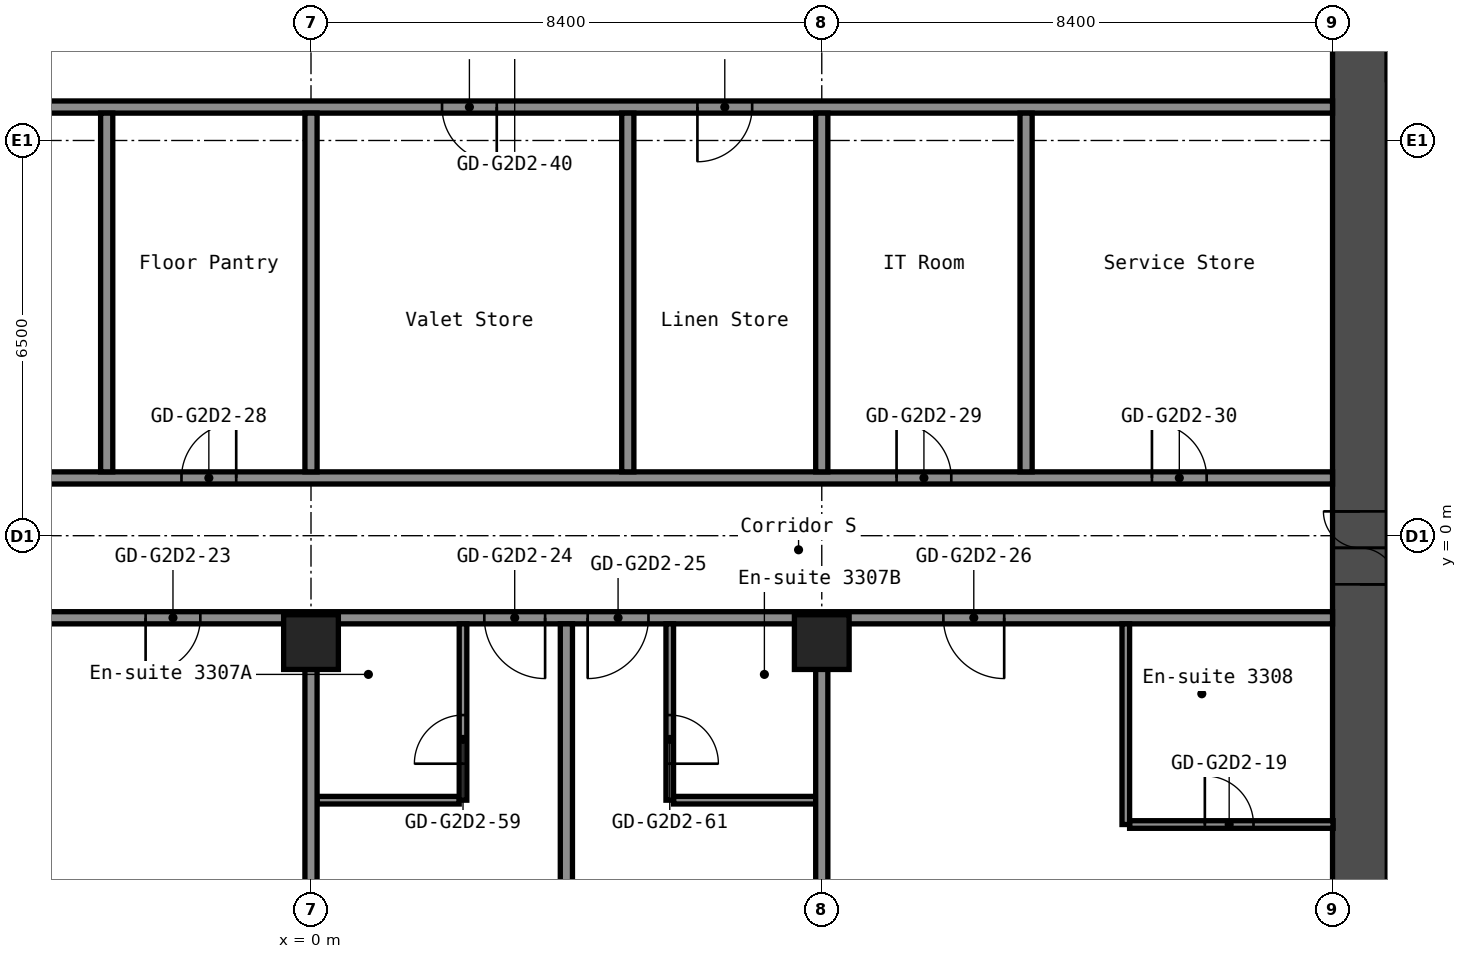
"""IFC4 building model, lengths in metres.
Left out: names, types, materials, properties, quantities, classifications, styles, units other than length and angle.
Written with IfcOpenShell. Run it as: python <this file> out.ifc"""

import sys

from ifc_helpers import new_model, si_unit, direction, frame, frame_2d, origin, origin_2d, place, context, subcontext, project, spatial, rectangle, hollow_rectangle, extrude, element, fill, save


model = new_model("IFC4")
c1 = context("Model", 3, precision=1e-05, world=origin(), true_north=direction((0.0, 1.0)))
c2 = subcontext(c1, "Body", "Model", "MODEL_VIEW")
j1 = project(units=[si_unit("LENGTHUNIT", "METRE"), si_unit("PLANEANGLEUNIT", "RADIAN")], contexts=[c1])
p1 = place(None, origin())
s1 = spatial("IfcSite", under=j1, at=p1, CompositionType="ELEMENT")
p2 = place(p1, origin())
s2 = spatial("IfcBuilding", under=s1, at=p2, CompositionType="ELEMENT")
p3 = place(p2, frame((0.0, 0.0, 117.0)))
s3 = spatial("IfcBuildingStorey", under=s2, at=p3, CompositionType="ELEMENT", Elevation=117.0)
for number, where, z_axis, x_axis in (
    (1, (0.0, -1.75, 0.0), (0.0, 0.0, 1.0), (1.0, 0.0, 0.0)),
    (2, (8.4, -1.75, 0.0), (0.0, 0.0, 1.0), (1.0, 0.0, 0.0)),
):
    element("IfcColumn", number, at=place(p3, frame(where, z_axis=z_axis, x_axis=x_axis)), inside=s3, PredefinedType="COLUMN", context=c2, shape_type="SweptSolid", body=[
        extrude(hollow_rectangle(XDim=0.9, YDim=0.9, WallThickness=0.036, at=origin_2d()), origin(), (0.0, 0.0, 1.0), 2.9),
    ])
p4 = place(p3, frame((17.25, -8.4, 0.0), z_axis=(0.0, 0.0, 1.0), x_axis=(0.0, 1.0, 0.0)))
e3 = element("IfcWall", 3, at=p4, inside=s3, PredefinedType="SHEAR", context=c2, shape_type="SweptSolid", body=[
    extrude(rectangle(XDim=16.8, YDim=0.9, at=frame_2d((8.4, 0.0))), origin(), (0.0, 0.0, 1.0), 2.9),
])
p5 = place(p4, frame((7.6, 0.0, 0.0)))
e4 = element("IfcOpeningElement", 4, at=p5, cuts=e3, PredefinedType="OPENING", context=c2, shape_type="SweptSolid", body=[
    extrude(rectangle(XDim=1.2, YDim=2.1, at=frame_2d((0.6, 1.05))), frame((0.0, 0.46, 0.0), z_axis=(0.0, -1.0, 0.0), x_axis=(1.0, 0.0, 0.0)), (0.0, 0.0, 1.0), 0.92),
])
p6 = place(p3, frame((17.7, 7.95, 0.0), z_axis=(0.0, 0.0, 1.0), x_axis=(1.0, 0.0, 0.0)))
e5 = element("IfcWall", 5, at=p6, inside=s3, PredefinedType="SHEAR", context=c2, shape_type="SweptSolid", body=[
    extrude(rectangle(XDim=15.0, YDim=0.9, at=frame_2d((7.5, 0.0))), origin(), (0.0, 0.0, 1.0), 2.9),
])
p7 = place(p6, frame((10.4, 0.0, 0.0)))
e6 = element("IfcOpeningElement", 6, at=p7, cuts=e5, PredefinedType="OPENING", context=c2, shape_type="SweptSolid", body=[
    extrude(rectangle(XDim=1.2, YDim=2.1, at=frame_2d((0.6, 1.05))), frame((0.0, 0.46, 0.0), z_axis=(0.0, -1.0, 0.0), x_axis=(1.0, 0.0, 0.0)), (0.0, 0.0, 1.0), 0.92),
])
p8 = place(p6, frame((13.35, 0.0, 0.0)))
e7 = element("IfcOpeningElement", 7, at=p8, cuts=e5, PredefinedType="OPENING", context=c2, shape_type="SweptSolid", body=[
    extrude(rectangle(XDim=0.9, YDim=2.1, at=frame_2d((0.45, 1.05))), frame((0.0, 0.46, 0.0), z_axis=(0.0, -1.0, 0.0), x_axis=(1.0, 0.0, 0.0)), (0.0, 0.0, 1.0), 0.92),
])
p9 = place(p3, frame((13.462, -4.75, 0.0), z_axis=(0.0, 0.0, 1.0), x_axis=(1.0, 0.0, 0.0)))
e8 = element("IfcWall", 8, at=p9, inside=s3, PredefinedType="PARTITIONING", context=c2, shape_type="SweptSolid", body=[
    extrude(rectangle(XDim=3.348, YDim=0.125, at=frame_2d((1.674, 0.0))), origin(), (0.0, 0.0, 1.0), 2.9),
])
p10 = place(p9, frame((1.238, 0.0, 0.0)))
e9 = element("IfcOpeningElement", 9, at=p10, cuts=e8, PredefinedType="OPENING", context=c2, shape_type="SweptSolid", body=[
    extrude(rectangle(XDim=0.8, YDim=2.1, at=frame_2d((0.4, 1.05))), frame((0.0, 0.073, 0.0), z_axis=(0.0, -1.0, 0.0), x_axis=(1.0, 0.0, 0.0)), (0.0, 0.0, 1.0), 0.145),
])
p11 = place(p3, frame((0.1, -4.35, 0.0), z_axis=(0.0, 0.0, 1.0), x_axis=(1.0, 0.0, 0.0)))
e10 = element("IfcWall", 10, at=p11, inside=s3, PredefinedType="PARTITIONING", context=c2, shape_type="SweptSolid", body=[
    extrude(rectangle(XDim=2.337, YDim=0.125, at=frame_2d((1.169, 0.0))), origin(), (0.0, 0.0, 1.0), 2.9),
])
p12 = place(p3, frame((5.962, -4.35, 0.0), z_axis=(0.0, 0.0, 1.0), x_axis=(1.0, 0.0, 0.0)))
e11 = element("IfcWall", 11, at=p12, inside=s3, PredefinedType="PARTITIONING", context=c2, shape_type="SweptSolid", body=[
    extrude(rectangle(XDim=2.338, YDim=0.125, at=frame_2d((1.169, 0.0))), origin(), (0.0, 0.0, 1.0), 2.9),
])
p13 = place(p3, frame((-16.8, -1.35, 0.0), z_axis=(0.0, 0.0, 1.0), x_axis=(1.0, 0.0, 0.0)))
e12 = element("IfcWall", 12, at=p13, inside=s3, PredefinedType="PARTITIONING", context=c2, shape_type="SweptSolid", body=[
    extrude(rectangle(XDim=33.6, YDim=0.2, at=frame_2d((16.8, 0.0))), origin(), (0.0, 0.0, 1.0), 2.9),
])
p14 = place(p13, frame((2.85, 0.0, 0.0)))
e13 = element("IfcOpeningElement", 13, at=p14, cuts=e12, PredefinedType="OPENING", context=c2, shape_type="SweptSolid", body=[
    extrude(rectangle(XDim=1.0, YDim=2.1, at=frame_2d((0.5, 1.05))), frame((0.0, 0.11, 0.0), z_axis=(0.0, -1.0, 0.0), x_axis=(1.0, 0.0, 0.0)), (0.0, 0.0, 1.0), 0.22),
])
p15 = place(p13, frame((4.55, 0.0, 0.0)))
e14 = element("IfcOpeningElement", 14, at=p15, cuts=e12, PredefinedType="OPENING", context=c2, shape_type="SweptSolid", body=[
    extrude(rectangle(XDim=1.0, YDim=2.1, at=frame_2d((0.5, 1.05))), frame((0.0, 0.11, 0.0), z_axis=(0.0, -1.0, 0.0), x_axis=(1.0, 0.0, 0.0)), (0.0, 0.0, 1.0), 0.22),
])
p16 = place(p13, frame((9.88, 0.0, 0.0)))
e15 = element("IfcOpeningElement", 15, at=p16, cuts=e12, PredefinedType="OPENING", context=c2, shape_type="SweptSolid", body=[
    extrude(rectangle(XDim=0.9, YDim=2.1, at=frame_2d((0.45, 1.05))), frame((0.0, 0.11, 0.0), z_axis=(0.0, -1.0, 0.0), x_axis=(1.0, 0.0, 0.0)), (0.0, 0.0, 1.0), 0.22),
])
p17 = place(p13, frame((14.08, 0.0, 0.0)))
e16 = element("IfcOpeningElement", 16, at=p17, cuts=e12, PredefinedType="OPENING", context=c2, shape_type="SweptSolid", body=[
    extrude(rectangle(XDim=0.9, YDim=2.1, at=frame_2d((0.45, 1.05))), frame((0.0, 0.11, 0.0), z_axis=(0.0, -1.0, 0.0), x_axis=(1.0, 0.0, 0.0)), (0.0, 0.0, 1.0), 0.22),
])
p18 = place(p13, frame((19.65, 0.0, 0.0)))
e17 = element("IfcOpeningElement", 17, at=p18, cuts=e12, PredefinedType="OPENING", context=c2, shape_type="SweptSolid", body=[
    extrude(rectangle(XDim=1.0, YDim=2.1, at=frame_2d((0.5, 1.05))), frame((0.0, 0.11, 0.0), z_axis=(0.0, -1.0, 0.0), x_axis=(1.0, 0.0, 0.0)), (0.0, 0.0, 1.0), 0.22),
])
p19 = place(p13, frame((21.35, 0.0, 0.0)))
e18 = element("IfcOpeningElement", 18, at=p19, cuts=e12, PredefinedType="OPENING", context=c2, shape_type="SweptSolid", body=[
    extrude(rectangle(XDim=1.0, YDim=2.1, at=frame_2d((0.5, 1.05))), frame((0.0, 0.11, 0.0), z_axis=(0.0, -1.0, 0.0), x_axis=(1.0, 0.0, 0.0)), (0.0, 0.0, 1.0), 0.22),
])
p20 = place(p13, frame((27.2, 0.0, 0.0)))
e19 = element("IfcOpeningElement", 19, at=p20, cuts=e12, PredefinedType="OPENING", context=c2, shape_type="SweptSolid", body=[
    extrude(rectangle(XDim=1.0, YDim=2.1, at=frame_2d((0.5, 1.05))), frame((0.0, 0.11, 0.0), z_axis=(0.0, -1.0, 0.0), x_axis=(1.0, 0.0, 0.0)), (0.0, 0.0, 1.0), 0.22),
])
p21 = place(p3, frame((-16.8, 0.95, 0.0), z_axis=(0.0, 0.0, 1.0), x_axis=(1.0, 0.0, 0.0)))
e20 = element("IfcWall", 20, at=p21, inside=s3, PredefinedType="PARTITIONING", context=c2, shape_type="SweptSolid", body=[
    extrude(rectangle(XDim=33.6, YDim=0.2, at=frame_2d((16.8, 0.0))), origin(), (0.0, 0.0, 1.0), 2.9),
])
p22 = place(p21, frame((10.47, 0.0, 0.0)))
e21 = element("IfcOpeningElement", 21, at=p22, cuts=e20, PredefinedType="OPENING", context=c2, shape_type="SweptSolid", body=[
    extrude(rectangle(XDim=0.9, YDim=2.1, at=frame_2d((0.45, 1.05))), frame((0.0, 0.11, 0.0), z_axis=(0.0, -1.0, 0.0), x_axis=(1.0, 0.0, 0.0)), (0.0, 0.0, 1.0), 0.22),
])
p23 = place(p21, frame((14.67, 0.0, 0.0)))
e22 = element("IfcOpeningElement", 22, at=p23, cuts=e20, PredefinedType="OPENING", context=c2, shape_type="SweptSolid", body=[
    extrude(rectangle(XDim=0.9, YDim=2.1, at=frame_2d((0.45, 1.05))), frame((0.0, 0.11, 0.0), z_axis=(0.0, -1.0, 0.0), x_axis=(1.0, 0.0, 0.0)), (0.0, 0.0, 1.0), 0.22),
])
p24 = place(p21, frame((26.43, 0.0, 0.0)))
e23 = element("IfcOpeningElement", 23, at=p24, cuts=e20, PredefinedType="OPENING", context=c2, shape_type="SweptSolid", body=[
    extrude(rectangle(XDim=0.9, YDim=2.1, at=frame_2d((0.45, 1.05))), frame((0.0, 0.11, 0.0), z_axis=(0.0, -1.0, 0.0), x_axis=(1.0, 0.0, 0.0)), (0.0, 0.0, 1.0), 0.22),
])
p25 = place(p21, frame((30.63, 0.0, 0.0)))
e24 = element("IfcOpeningElement", 24, at=p25, cuts=e20, PredefinedType="OPENING", context=c2, shape_type="SweptSolid", body=[
    extrude(rectangle(XDim=0.9, YDim=2.1, at=frame_2d((0.45, 1.05))), frame((0.0, 0.11, 0.0), z_axis=(0.0, -1.0, 0.0), x_axis=(1.0, 0.0, 0.0)), (0.0, 0.0, 1.0), 0.22),
])
p26 = place(p3, frame((-16.8, 7.05, 0.0), z_axis=(0.0, 0.0, 1.0), x_axis=(1.0, 0.0, 0.0)))
e25 = element("IfcWall", 25, at=p26, inside=s3, PredefinedType="PARTITIONING", context=c2, shape_type="SweptSolid", body=[
    extrude(rectangle(XDim=33.6, YDim=0.2, at=frame_2d((16.8, 0.0))), origin(), (0.0, 0.0, 1.0), 2.9),
])
p27 = place(p26, frame((1.315, 0.0, 0.0)))
e26 = element("IfcOpeningElement", 26, at=p27, cuts=e25, PredefinedType="OPENING", context=c2, shape_type="SweptSolid", body=[
    extrude(rectangle(XDim=0.9, YDim=2.1, at=frame_2d((0.45, 1.05))), frame((0.0, 0.11, 0.0), z_axis=(0.0, -1.0, 0.0), x_axis=(1.0, 0.0, 0.0)), (0.0, 0.0, 1.0), 0.22),
])
p28 = place(p26, frame((5.515, 0.0, 0.0)))
e27 = element("IfcOpeningElement", 27, at=p28, cuts=e25, PredefinedType="OPENING", context=c2, shape_type="SweptSolid", body=[
    extrude(rectangle(XDim=0.9, YDim=2.1, at=frame_2d((0.45, 1.05))), frame((0.0, 0.11, 0.0), z_axis=(0.0, -1.0, 0.0), x_axis=(1.0, 0.0, 0.0)), (0.0, 0.0, 1.0), 0.22),
])
p29 = place(p26, frame((18.955, 0.0, 0.0)))
e28 = element("IfcOpeningElement", 28, at=p29, cuts=e25, PredefinedType="OPENING", context=c2, shape_type="SweptSolid", body=[
    extrude(rectangle(XDim=0.9, YDim=2.1, at=frame_2d((0.45, 1.05))), frame((0.0, 0.11, 0.0), z_axis=(0.0, -1.0, 0.0), x_axis=(1.0, 0.0, 0.0)), (0.0, 0.0, 1.0), 0.22),
])
p30 = place(p26, frame((23.155, 0.0, 0.0)))
e29 = element("IfcOpeningElement", 29, at=p30, cuts=e25, PredefinedType="OPENING", context=c2, shape_type="SweptSolid", body=[
    extrude(rectangle(XDim=0.9, YDim=2.1, at=frame_2d((0.45, 1.05))), frame((0.0, 0.11, 0.0), z_axis=(0.0, -1.0, 0.0), x_axis=(1.0, 0.0, 0.0)), (0.0, 0.0, 1.0), 0.22),
])
p31 = place(p3, frame((-3.36, 1.05, 0.0), z_axis=(0.0, 0.0, 1.0), x_axis=(0.0, 1.0, 0.0)))
e30 = element("IfcWall", 30, at=p31, inside=s3, PredefinedType="PARTITIONING", context=c2, shape_type="SweptSolid", body=[
    extrude(rectangle(XDim=5.9, YDim=0.2, at=frame_2d((2.95, 0.0))), origin(), (0.0, 0.0, 1.0), 2.9),
])
p32 = place(p3, frame((0.0, -15.55, 0.0), z_axis=(0.0, 0.0, 1.0), x_axis=(0.0, 1.0, 0.0)))
e31 = element("IfcWall", 31, at=p32, inside=s3, PredefinedType="PARTITIONING", context=c2, shape_type="SweptSolid", body=[
    extrude(rectangle(XDim=13.36, YDim=0.2, at=frame_2d((6.68, 0.0))), origin(), (0.0, 0.0, 1.0), 2.9),
])
p33 = place(p3, frame((0.0, 1.05, 0.0), z_axis=(0.0, 0.0, 1.0), x_axis=(0.0, 1.0, 0.0)))
e32 = element("IfcWall", 32, at=p33, inside=s3, PredefinedType="PARTITIONING", context=c2, shape_type="SweptSolid", body=[
    extrude(rectangle(XDim=5.9, YDim=0.2, at=frame_2d((2.95, 0.0))), origin(), (0.0, 0.0, 1.0), 2.9),
])
p34 = place(p3, frame((2.5, -4.35, 0.0), z_axis=(0.0, 0.0, 1.0), x_axis=(0.0, 1.0, 0.0)))
e33 = element("IfcWall", 33, at=p34, inside=s3, PredefinedType="PARTITIONING", context=c2, shape_type="SweptSolid", body=[
    extrude(rectangle(XDim=2.9, YDim=0.125, at=frame_2d((1.45, 0.0))), origin(), (0.0, 0.0, 1.0), 2.9),
])
p35 = place(p34, frame((0.6, 0.0, 0.0)))
e34 = element("IfcOpeningElement", 34, at=p35, cuts=e33, PredefinedType="OPENING", context=c2, shape_type="SweptSolid", body=[
    extrude(rectangle(XDim=0.8, YDim=2.1, at=frame_2d((0.4, 1.05))), frame((0.0, 0.073, 0.0), z_axis=(0.0, -1.0, 0.0), x_axis=(1.0, 0.0, 0.0)), (0.0, 0.0, 1.0), 0.145),
])
p36 = place(p3, frame((4.2, -15.55, 0.0), z_axis=(0.0, 0.0, 1.0), x_axis=(0.0, 1.0, 0.0)))
e35 = element("IfcWall", 35, at=p36, inside=s3, PredefinedType="PARTITIONING", context=c2, shape_type="SweptSolid", body=[
    extrude(rectangle(XDim=14.1, YDim=0.2, at=frame_2d((7.05, 0.0))), origin(), (0.0, 0.0, 1.0), 2.9),
])
p37 = place(p3, frame((5.21, 1.05, 0.0), z_axis=(0.0, 0.0, 1.0), x_axis=(0.0, 1.0, 0.0)))
e36 = element("IfcWall", 36, at=p37, inside=s3, PredefinedType="PARTITIONING", context=c2, shape_type="SweptSolid", body=[
    extrude(rectangle(XDim=5.9, YDim=0.2, at=frame_2d((2.95, 0.0))), origin(), (0.0, 0.0, 1.0), 2.9),
])
p38 = place(p3, frame((5.9, -4.35, 0.0), z_axis=(0.0, 0.0, 1.0), x_axis=(0.0, 1.0, 0.0)))
e37 = element("IfcWall", 37, at=p38, inside=s3, PredefinedType="PARTITIONING", context=c2, shape_type="SweptSolid", body=[
    extrude(rectangle(XDim=2.9, YDim=0.125, at=frame_2d((1.45, 0.0))), origin(), (0.0, 0.0, 1.0), 2.9),
])
p39 = place(p38, frame((0.6, 0.0, 0.0)))
e38 = element("IfcOpeningElement", 38, at=p39, cuts=e37, PredefinedType="OPENING", context=c2, shape_type="SweptSolid", body=[
    extrude(rectangle(XDim=0.8, YDim=2.1, at=frame_2d((0.4, 1.05))), frame((0.0, 0.073, 0.0), z_axis=(0.0, -1.0, 0.0), x_axis=(1.0, 0.0, 0.0)), (0.0, 0.0, 1.0), 0.145),
])
p40 = place(p3, frame((8.4, -15.55, 0.0), z_axis=(0.0, 0.0, 1.0), x_axis=(0.0, 1.0, 0.0)))
e39 = element("IfcWall", 39, at=p40, inside=s3, PredefinedType="PARTITIONING", context=c2, shape_type="SweptSolid", body=[
    extrude(rectangle(XDim=13.36, YDim=0.2, at=frame_2d((6.68, 0.0))), origin(), (0.0, 0.0, 1.0), 2.9),
])
for number, where, z_axis, x_axis in (
    (40, (8.4, 1.05, 0.0), (0.0, 0.0, 1.0), (0.0, 1.0, 0.0)),
    (41, (11.76, 1.05, 0.0), (0.0, 0.0, 1.0), (0.0, 1.0, 0.0)),
):
    element("IfcWall", number, at=place(p3, frame(where, z_axis=z_axis, x_axis=x_axis)), inside=s3, PredefinedType="PARTITIONING", context=c2, shape_type="SweptSolid", body=[
        extrude(rectangle(XDim=5.9, YDim=0.2, at=frame_2d((2.95, 0.0))), origin(), (0.0, 0.0, 1.0), 2.9),
    ])
p41 = place(p3, frame((13.4, -4.75, 0.0), z_axis=(0.0, 0.0, 1.0), x_axis=(0.0, 1.0, 0.0)))
e42 = element("IfcWall", 42, at=p41, inside=s3, PredefinedType="PARTITIONING", context=c2, shape_type="SweptSolid", body=[
    extrude(rectangle(XDim=3.3, YDim=0.125, at=frame_2d((1.65, 0.0))), origin(), (0.0, 0.0, 1.0), 2.9),
])
p42 = place(p5, origin())
e43 = element("IfcDoor", 43, at=p42, inside=s3, OperationType="DOUBLE_DOOR_SINGLE_SWING", PredefinedType="DOOR", context=c2, shape_type="SweptSolid", body=[
    extrude(rectangle(XDim=1.2, YDim=2.1, at=frame_2d((0.6, 1.05))), frame((0.0, 0.025, 0.0), z_axis=(0.0, -1.0, 0.0), x_axis=(1.0, 0.0, 0.0)), (0.0, 0.0, 1.0), 0.05),
])
fill(e4, e43)
p43 = place(p10, origin())
e44 = element("IfcDoor", 44, at=p43, inside=s3, OperationType="SINGLE_SWING_RIGHT", PredefinedType="DOOR", context=c2, shape_type="SweptSolid", body=[
    extrude(rectangle(XDim=0.8, YDim=2.1, at=frame_2d((0.4, 1.05))), frame((0.0, 0.025, 0.0), z_axis=(0.0, -1.0, 0.0), x_axis=(1.0, 0.0, 0.0)), (0.0, 0.0, 1.0), 0.05),
])
fill(e9, e44)
p44 = place(p17, origin())
e45 = element("IfcDoor", 45, at=p44, inside=s3, OperationType="SINGLE_SWING_LEFT", PredefinedType="DOOR", context=c2, shape_type="SweptSolid", body=[
    extrude(rectangle(XDim=0.9, YDim=2.1, at=frame_2d((0.45, 1.05))), frame((0.0, 0.025, 0.0), z_axis=(0.0, -1.0, 0.0), x_axis=(1.0, 0.0, 0.0)), (0.0, 0.0, 1.0), 0.05),
])
fill(e16, e45)
p45 = place(p18, origin())
e46 = element("IfcDoor", 46, at=p45, inside=s3, OperationType="SINGLE_SWING_RIGHT", PredefinedType="DOOR", context=c2, shape_type="SweptSolid", body=[
    extrude(rectangle(XDim=1.0, YDim=2.1, at=frame_2d((0.5, 1.05))), frame((0.0, 0.025, 0.0), z_axis=(0.0, -1.0, 0.0), x_axis=(1.0, 0.0, 0.0)), (0.0, 0.0, 1.0), 0.05),
])
fill(e17, e46)
p46 = place(p19, origin())
e47 = element("IfcDoor", 47, at=p46, inside=s3, OperationType="SINGLE_SWING_LEFT", PredefinedType="DOOR", context=c2, shape_type="SweptSolid", body=[
    extrude(rectangle(XDim=1.0, YDim=2.1, at=frame_2d((0.5, 1.05))), frame((0.0, 0.025, 0.0), z_axis=(0.0, -1.0, 0.0), x_axis=(1.0, 0.0, 0.0)), (0.0, 0.0, 1.0), 0.05),
])
fill(e18, e47)
p47 = place(p20, origin())
e48 = element("IfcDoor", 48, at=p47, inside=s3, OperationType="SINGLE_SWING_RIGHT", PredefinedType="DOOR", context=c2, shape_type="SweptSolid", body=[
    extrude(rectangle(XDim=1.0, YDim=2.1, at=frame_2d((0.5, 1.05))), frame((0.0, 0.025, 0.0), z_axis=(0.0, -1.0, 0.0), x_axis=(1.0, 0.0, 0.0)), (0.0, 0.0, 1.0), 0.05),
])
fill(e19, e48)
p48 = place(p23, origin())
e49 = element("IfcDoor", 49, at=p48, inside=s3, OperationType="SINGLE_SWING_LEFT", PredefinedType="DOOR", context=c2, shape_type="SweptSolid", body=[
    extrude(rectangle(XDim=0.9, YDim=2.1, at=frame_2d((0.45, 1.05))), frame((0.0, 0.025, 0.0), z_axis=(0.0, -1.0, 0.0), x_axis=(1.0, 0.0, 0.0)), (0.0, 0.0, 1.0), 0.05),
])
fill(e22, e49)
p49 = place(p24, origin())
e50 = element("IfcDoor", 50, at=p49, inside=s3, OperationType="SINGLE_SWING_RIGHT", PredefinedType="DOOR", context=c2, shape_type="SweptSolid", body=[
    extrude(rectangle(XDim=0.9, YDim=2.1, at=frame_2d((0.45, 1.05))), frame((0.0, 0.025, 0.0), z_axis=(0.0, -1.0, 0.0), x_axis=(1.0, 0.0, 0.0)), (0.0, 0.0, 1.0), 0.05),
])
fill(e23, e50)
p50 = place(p25, origin())
e51 = element("IfcDoor", 51, at=p50, inside=s3, OperationType="SINGLE_SWING_RIGHT", PredefinedType="DOOR", context=c2, shape_type="SweptSolid", body=[
    extrude(rectangle(XDim=0.9, YDim=2.1, at=frame_2d((0.45, 1.05))), frame((0.0, 0.025, 0.0), z_axis=(0.0, -1.0, 0.0), x_axis=(1.0, 0.0, 0.0)), (0.0, 0.0, 1.0), 0.05),
])
fill(e24, e51)
p51 = place(p29, origin())
e52 = element("IfcDoor", 52, at=p51, inside=s3, OperationType="SINGLE_SWING_RIGHT", PredefinedType="DOOR", context=c2, shape_type="SweptSolid", body=[
    extrude(rectangle(XDim=0.9, YDim=2.1, at=frame_2d((0.45, 1.05))), frame((0.0, 0.025, 0.0), z_axis=(0.0, -1.0, 0.0), x_axis=(1.0, 0.0, 0.0)), (0.0, 0.0, 1.0), 0.05),
])
fill(e28, e52)
p52 = place(p30, origin())
e53 = element("IfcDoor", 53, at=p52, inside=s3, OperationType="SINGLE_SWING_LEFT", PredefinedType="DOOR", context=c2, shape_type="SweptSolid", body=[
    extrude(rectangle(XDim=0.9, YDim=2.1, at=frame_2d((0.45, 1.05))), frame((0.0, 0.025, 0.0), z_axis=(0.0, -1.0, 0.0), x_axis=(1.0, 0.0, 0.0)), (0.0, 0.0, 1.0), 0.05),
])
fill(e29, e53)
p53 = place(p35, origin())
e54 = element("IfcDoor", 54, at=p53, inside=s3, OperationType="SINGLE_SWING_RIGHT", PredefinedType="DOOR", context=c2, shape_type="SweptSolid", body=[
    extrude(rectangle(XDim=0.8, YDim=2.1, at=frame_2d((0.4, 1.05))), frame((0.0, 0.025, 0.0), z_axis=(0.0, -1.0, 0.0), x_axis=(1.0, 0.0, 0.0)), (0.0, 0.0, 1.0), 0.05),
])
fill(e34, e54)
p54 = place(p39, origin())
e55 = element("IfcDoor", 55, at=p54, inside=s3, OperationType="SINGLE_SWING_LEFT", PredefinedType="DOOR", context=c2, shape_type="SweptSolid", body=[
    extrude(rectangle(XDim=0.8, YDim=2.1, at=frame_2d((0.4, 1.05))), frame((0.0, 0.025, 0.0), z_axis=(0.0, -1.0, 0.0), x_axis=(1.0, 0.0, 0.0)), (0.0, 0.0, 1.0), 0.05),
])
fill(e38, e55)
save(model, sys.argv[1])
